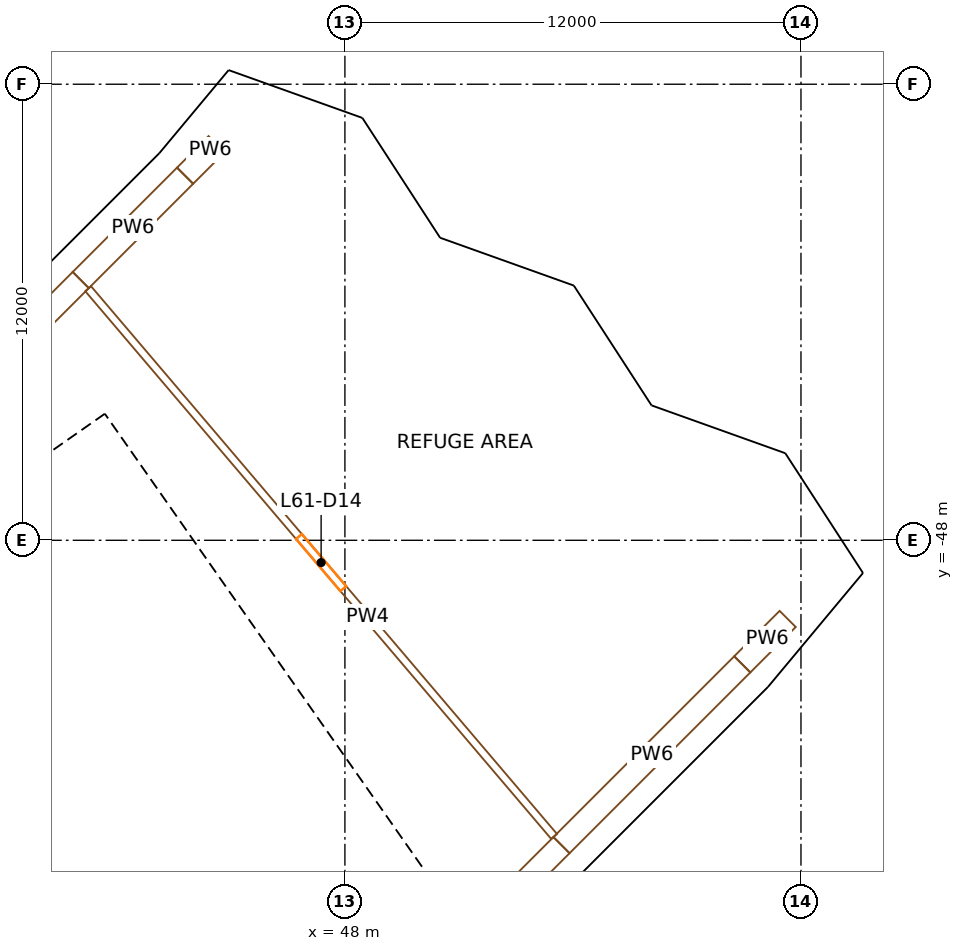
"""IFC4 building model, lengths in metres.
Left out: names, types, materials, properties, quantities, classifications, styles, units other than length and angle.
Written with IfcOpenShell. Run it as: python <this file> out.ifc"""

import sys

from ifc_helpers import new_model, si_unit, direction, frame, frame_2d, origin, origin_2d, place, context, subcontext, project, spatial, rectangle, extrude, element, fill, save


model = new_model("IFC4")
c1 = context("Model", 3, precision=1e-05, world=origin(), true_north=direction((0.0, 1.0)))
c2 = subcontext(c1, "Body", "Model", "MODEL_VIEW")
j1 = project(units=[si_unit("LENGTHUNIT", "METRE"), si_unit("PLANEANGLEUNIT", "RADIAN")], contexts=[c1])
p1 = place(None, origin())
s1 = spatial("IfcSite", under=j1, at=p1, CompositionType="ELEMENT")
p2 = place(p1, origin())
s2 = spatial("IfcBuilding", under=s1, at=p2, CompositionType="ELEMENT")
p3 = place(p2, frame((0.0, 0.0, 253.1)))
s3 = spatial("IfcBuildingStorey", under=s2, at=p3, CompositionType="ELEMENT", Elevation=253.1)
for number, where, z_axis, x_axis in (
    (1, (43.795, -38.407, 0.0), (0.0, 0.0, 1.0), (0.659, 0.752, 0.0)),
    (2, (58.456, -51.264, 0.0), (0.0, 0.0, 1.0), (0.659, 0.752, 0.0)),
):
    element("IfcColumn", number, at=place(p3, frame(where, z_axis=z_axis, x_axis=x_axis)), inside=s3, PredefinedType="COLUMN", context=c2, shape_type="SweptSolid", body=[
        extrude(rectangle(XDim=1.0, YDim=1.15, at=origin_2d()), origin(), (0.0, 0.0, 1.0), 5.0),
    ])
p4 = place(p3, frame((49.483, -57.031, 0.0), z_axis=(0.0, 0.0, 1.0), x_axis=(-0.573560421458, 0.819163257805, 0.0)))
e3 = element("IfcWall", 3, at=p4, inside=s3, PredefinedType="SHEAR", context=c2, shape_type="SweptSolid", body=[
    extrude(rectangle(XDim=14.2, YDim=0.6, at=frame_2d((7.1, 0.0))), origin(), (0.0, 0.0, 1.0), 4.7),
])
p5 = place(p4, frame((6.4, 0.0, 0.0)))
e4 = element("IfcOpeningElement", 4, at=p5, cuts=e3, PredefinedType="OPENING", context=c2, shape_type="SweptSolid", body=[
    extrude(rectangle(XDim=1.4, YDim=2.1, at=frame_2d((0.7, 1.05))), frame((0.0, 0.31, 0.0), z_axis=(0.0, -1.0, 0.0), x_axis=(1.0, 0.0, 0.0)), (0.0, 0.0, 1.0), 0.62),
])
p6 = place(p3, frame((28.941, -54.447, 0.0), z_axis=(0.0, 0.0, 1.0), x_axis=(0.819153391756, 0.573574511963, 0.0)))
e5 = element("IfcWall", 5, at=p6, inside=s3, PredefinedType="SHEAR", context=c2, shape_type="SweptSolid", body=[
    extrude(rectangle(XDim=15.045, YDim=0.6, at=frame_2d((7.523, 0.0))), origin(), (0.0, 0.0, 1.0), 4.7),
])
p7 = place(p6, frame((3.45, 0.0, 0.0)))
e6 = element("IfcOpeningElement", 6, at=p7, cuts=e5, PredefinedType="OPENING", context=c2, shape_type="SweptSolid", body=[
    extrude(rectangle(XDim=1.0, YDim=2.1, at=frame_2d((0.5, 1.05))), frame((0.0, 0.31, 0.0), z_axis=(0.0, -1.0, 0.0), x_axis=(1.0, 0.0, 0.0)), (0.0, 0.0, 1.0), 0.62),
])
p8 = place(p6, frame((13.495, 0.0, 0.0)))
e7 = element("IfcOpeningElement", 7, at=p8, cuts=e5, PredefinedType="OPENING", context=c2, shape_type="SweptSolid", body=[
    extrude(rectangle(XDim=1.1, YDim=2.1, at=frame_2d((0.55, 1.05))), frame((0.0, 0.31, 0.0), z_axis=(0.0, -1.0, 0.0), x_axis=(1.0, 0.0, 0.0)), (0.0, 0.0, 1.0), 0.62),
])
p9 = place(p3, frame((36.741, -65.587, 0.0), z_axis=(0.0, 0.0, 1.0), x_axis=(0.819153391756, 0.573574511963, 0.0)))
e8 = element("IfcWall", 8, at=p9, inside=s3, PredefinedType="SHEAR", context=c2, shape_type="SweptSolid", body=[
    extrude(rectangle(XDim=15.045, YDim=0.6, at=frame_2d((7.523, 0.0))), origin(), (0.0, 0.0, 1.0), 4.7),
])
p10 = place(p9, frame((3.45, 0.0, 0.0)))
e9 = element("IfcOpeningElement", 9, at=p10, cuts=e8, PredefinedType="OPENING", context=c2, shape_type="SweptSolid", body=[
    extrude(rectangle(XDim=1.0, YDim=2.1, at=frame_2d((0.5, 1.05))), frame((0.0, 0.31, 0.0), z_axis=(0.0, -1.0, 0.0), x_axis=(1.0, 0.0, 0.0)), (0.0, 0.0, 1.0), 0.62),
])
p11 = place(p9, frame((13.495, 0.0, 0.0)))
e10 = element("IfcOpeningElement", 10, at=p11, cuts=e8, PredefinedType="OPENING", context=c2, shape_type="SweptSolid", body=[
    extrude(rectangle(XDim=1.1, YDim=2.1, at=frame_2d((0.55, 1.05))), frame((0.0, 0.31, 0.0), z_axis=(0.0, -1.0, 0.0), x_axis=(1.0, 0.0, 0.0)), (0.0, 0.0, 1.0), 0.62),
])
p12 = place(p3, frame((43.204, -60.696, 0.0), z_axis=(0.0, 0.0, 1.0), x_axis=(-0.573571992966, 0.819155155563, 0.0)))
e11 = element("IfcWall", 11, at=p12, inside=s3, PredefinedType="SOLIDWALL", context=c2, shape_type="SweptSolid", body=[
    extrude(rectangle(XDim=13.0, YDim=0.3, at=frame_2d((6.5, 0.0))), origin(), (0.0, 0.0, 1.0), 4.7),
])
p13 = place(p3, frame((33.787, -61.369, 0.0), z_axis=(0.0, 0.0, 1.0), x_axis=(0.819152564888, 0.573575692858, 0.0)))
e12 = element("IfcWall", 12, at=p13, inside=s3, PredefinedType="SOLIDWALL", context=c2, shape_type="SweptSolid", body=[
    extrude(rectangle(XDim=7.95, YDim=0.3, at=frame_2d((3.975, 0.0))), origin(), (0.0, 0.0, 1.0), 4.7),
])
p14 = place(p13, frame((0.675, 0.0, 0.0)))
e13 = element("IfcOpeningElement", 13, at=p14, cuts=e12, PredefinedType="OPENING", context=c2, shape_type="SweptSolid", body=[
    extrude(rectangle(XDim=1.1, YDim=2.1, at=frame_2d((0.55, 1.05))), frame((0.0, 0.16, 0.0), z_axis=(0.0, -1.0, 0.0), x_axis=(1.0, 0.0, 0.0)), (0.0, 0.0, 1.0), 0.32),
])
p15 = place(p13, frame((3.425, 0.0, 0.0)))
e14 = element("IfcOpeningElement", 14, at=p15, cuts=e12, PredefinedType="OPENING", context=c2, shape_type="SweptSolid", body=[
    extrude(rectangle(XDim=1.1, YDim=2.1, at=frame_2d((0.55, 1.05))), frame((0.0, 0.16, 0.0), z_axis=(0.0, -1.0, 0.0), x_axis=(1.0, 0.0, 0.0)), (0.0, 0.0, 1.0), 0.32),
])
p16 = place(p3, frame((37.936, -52.91, 0.0), z_axis=(0.0, 0.0, 1.0), x_axis=(0.819147518138, 0.57358290031, 0.0)))
e15 = element("IfcWall", 15, at=p16, inside=s3, PredefinedType="SOLIDWALL", context=c2, shape_type="SweptSolid", body=[
    extrude(rectangle(XDim=6.795, YDim=0.3, at=frame_2d((3.398, 0.0))), origin(), (0.0, 0.0, 1.0), 4.7),
])
p17 = place(p16, frame((5.32, 0.0, 0.0)))
e16 = element("IfcOpeningElement", 16, at=p17, cuts=e15, PredefinedType="OPENING", context=c2, shape_type="SweptSolid", body=[
    extrude(rectangle(XDim=1.1, YDim=2.1, at=frame_2d((0.55, 1.05))), frame((0.0, 0.16, 0.0), z_axis=(0.0, -1.0, 0.0), x_axis=(1.0, 0.0, 0.0)), (0.0, 0.0, 1.0), 0.32),
])
p18 = place(p3, frame((41.262, -57.661, 0.0), z_axis=(0.0, 0.0, 1.0), x_axis=(0.819164398642, 0.573558792102, 0.0)))
e17 = element("IfcWall", 17, at=p18, inside=s3, PredefinedType="SOLIDWALL", context=c2, shape_type="SweptSolid", body=[
    extrude(rectangle(XDim=6.795, YDim=0.3, at=frame_2d((3.397, 0.0))), origin(), (0.0, 0.0, 1.0), 4.7),
])
p19 = place(p18, frame((5.32, 0.0, 0.0)))
e18 = element("IfcOpeningElement", 18, at=p19, cuts=e17, PredefinedType="OPENING", context=c2, shape_type="SweptSolid", body=[
    extrude(rectangle(XDim=1.1, YDim=2.1, at=frame_2d((0.55, 1.05))), frame((0.0, 0.16, 0.0), z_axis=(0.0, -1.0, 0.0), x_axis=(1.0, 0.0, 0.0)), (0.0, 0.0, 1.0), 0.32),
])
p20 = place(p3, frame((39.599, -55.285, 0.0), z_axis=(0.0, 0.0, 1.0), x_axis=(0.819136323161, 0.573598887793, 0.0)))
e19 = element("IfcWall", 19, at=p20, inside=s3, PredefinedType="SOLIDWALL", context=c2, shape_type="SweptSolid", body=[
    extrude(rectangle(XDim=3.0, YDim=0.5, at=frame_2d((1.5, 0.0))), origin(), (0.0, 0.0, 1.0), 4.7),
])
p21 = place(p3, frame((43.757, -55.731, 0.0), z_axis=(0.0, 0.0, 1.0), x_axis=(-0.573536818435, 0.819179783625, 0.0)))
e20 = element("IfcWall", 20, at=p21, inside=s3, PredefinedType="SOLIDWALL", context=c2, shape_type="SweptSolid", body=[
    extrude(rectangle(XDim=5.5, YDim=0.3, at=frame_2d((2.75, 0.0))), origin(), (0.0, 0.0, 1.0), 4.7),
])
p22 = place(p21, frame((0.7, 0.0, 0.0)))
e21 = element("IfcOpeningElement", 21, at=p22, cuts=e20, PredefinedType="OPENING", context=c2, shape_type="SweptSolid", body=[
    extrude(rectangle(XDim=1.1, YDim=2.1, at=frame_2d((0.55, 1.05))), frame((0.0, 0.16, 0.0), z_axis=(0.0, -1.0, 0.0), x_axis=(1.0, 0.0, 0.0)), (0.0, 0.0, 1.0), 0.32),
])
p23 = place(p21, frame((3.7, 0.0, 0.0)))
e22 = element("IfcOpeningElement", 22, at=p23, cuts=e20, PredefinedType="OPENING", context=c2, shape_type="SweptSolid", body=[
    extrude(rectangle(XDim=1.1, YDim=2.1, at=frame_2d((0.55, 1.05))), frame((0.0, 0.16, 0.0), z_axis=(0.0, -1.0, 0.0), x_axis=(1.0, 0.0, 0.0)), (0.0, 0.0, 1.0), 0.32),
])
p24 = place(p3, frame((41.3, -47.96, 0.0), z_axis=(0.0, 0.0, 1.0), x_axis=(0.573495128918, -0.819208970354, 0.0)))
e23 = element("IfcWall", 23, at=p24, inside=s3, PredefinedType="SOLIDWALL", context=c2, shape_type="SweptSolid", body=[
    extrude(rectangle(XDim=0.5, YDim=0.3, at=frame_2d((0.25, 0.0))), origin(), (0.0, 0.0, 1.0), 2.3),
])
p25 = place(p3, frame((46.778, -55.782, 0.0), z_axis=(0.0, 0.0, 1.0), x_axis=(0.573822822947, -0.818979467304, 0.0)))
e24 = element("IfcWall", 24, at=p25, inside=s3, PredefinedType="SOLIDWALL", context=c2, shape_type="SweptSolid", body=[
    extrude(rectangle(XDim=0.5, YDim=0.3, at=frame_2d((0.25, 0.0))), origin(), (0.0, 0.0, 1.0), 2.3),
])
p26 = place(p3, frame((61.487, -49.005, 0.0), z_axis=(0.0, 0.0, 1.0), x_axis=(-0.54407895318, 0.839034023569, 0.0)))
e25 = element("IfcWall", 25, at=p26, inside=s3, PredefinedType="SOLIDWALL", context=c2, shape_type="SweptSolid", body=[
    extrude(rectangle(XDim=3.851, YDim=0.4, at=frame_2d((1.926, 0.0))), origin(), (0.0, 0.0, 1.0), 3.6),
])
p27 = place(p3, frame((59.253, -45.802, 0.0), z_axis=(0.0, 0.0, 1.0), x_axis=(-0.941574689973, 0.336804250571, 0.0)))
e26 = element("IfcWall", 26, at=p27, inside=s3, PredefinedType="SOLIDWALL", context=c2, shape_type="SweptSolid", body=[
    extrude(rectangle(XDim=3.305, YDim=0.4, at=frame_2d((1.653, 0.0))), origin(), (0.0, 0.0, 1.0), 3.6),
])
p28 = place(p3, frame((56.002, -44.716, 0.0), z_axis=(0.0, 0.0, 1.0), x_axis=(-0.544198076362, 0.838956765086, 0.0)))
e27 = element("IfcWall", 27, at=p28, inside=s3, PredefinedType="SOLIDWALL", context=c2, shape_type="SweptSolid", body=[
    extrude(rectangle(XDim=3.997, YDim=0.4, at=frame_2d((1.999, 0.0))), origin(), (0.0, 0.0, 1.0), 3.6),
])
p29 = place(p3, frame((53.688, -41.39, 0.0), z_axis=(0.0, 0.0, 1.0), x_axis=(-0.94159640431, 0.336743539494, 0.0)))
e28 = element("IfcWall", 28, at=p29, inside=s3, PredefinedType="SOLIDWALL", context=c2, shape_type="SweptSolid", body=[
    extrude(rectangle(XDim=3.305, YDim=0.4, at=frame_2d((1.652, 0.0))), origin(), (0.0, 0.0, 1.0), 3.6),
])
p30 = place(p3, frame((50.438, -40.305, 0.0), z_axis=(0.0, 0.0, 1.0), x_axis=(-0.544258469642, 0.838917587265, 0.0)))
e29 = element("IfcWall", 29, at=p30, inside=s3, PredefinedType="SOLIDWALL", context=c2, shape_type="SweptSolid", body=[
    extrude(rectangle(XDim=3.999, YDim=0.4, at=frame_2d((1.999, 0.0))), origin(), (0.0, 0.0, 1.0), 3.6),
])
p31 = place(p3, frame((48.124, -36.979, 0.0), z_axis=(0.0, 0.0, 1.0), x_axis=(-0.941635407731, 0.336634458883, 0.0)))
e30 = element("IfcWall", 30, at=p31, inside=s3, PredefinedType="SOLIDWALL", context=c2, shape_type="SweptSolid", body=[
    extrude(rectangle(XDim=3.061, YDim=0.4, at=frame_2d((1.531, 0.0))), origin(), (0.0, 0.0, 1.0), 3.6),
])
p32 = place(p3, frame((43.239, -37.975, 0.0), z_axis=(0.0, 0.0, 1.0), x_axis=(-0.707106781187, -0.707106781187, 0.0)))
e31 = element("IfcWall", 31, at=p32, inside=s3, PredefinedType="SOLIDWALL", context=c2, shape_type="SweptSolid", body=[
    extrude(rectangle(XDim=7.435, YDim=0.4, at=frame_2d((3.718, 0.0))), origin(), (0.0, 0.0, 1.0), 3.6),
])
p33 = place(p3, frame((45.123, -35.721, 0.0), z_axis=(0.0, 0.0, 1.0), x_axis=(-0.64047220124, -0.767981353575, 0.0)))
e32 = element("IfcWall", 32, at=p33, inside=s3, PredefinedType="SOLIDWALL", context=c2, shape_type="SweptSolid", body=[
    extrude(rectangle(XDim=2.92, YDim=0.4, at=frame_2d((1.46, 0.0))), origin(), (0.0, 0.0, 1.0), 3.6),
])
p34 = place(p3, frame((51.708, -58.999, 0.0), z_axis=(0.0, 0.0, 1.0), x_axis=(0.707094942107, 0.707118620068, 0.0)))
e33 = element("IfcWall", 33, at=p34, inside=s3, PredefinedType="SOLIDWALL", context=c2, shape_type="SweptSolid", body=[
    extrude(rectangle(XDim=10.311, YDim=0.4, at=frame_2d((5.155, 0.0))), origin(), (0.0, 0.0, 1.0), 3.6),
])
p35 = place(p3, frame((59.009, -51.693, 0.0), z_axis=(0.0, 0.0, 1.0), x_axis=(0.640531267618, 0.76793209023, 0.0)))
e34 = element("IfcWall", 34, at=p35, inside=s3, PredefinedType="SOLIDWALL", context=c2, shape_type="SweptSolid", body=[
    extrude(rectangle(XDim=3.461, YDim=0.4, at=frame_2d((1.73, 0.0))), origin(), (0.0, 0.0, 1.0), 3.6),
])
p36 = place(p3, frame((38.423, -43.779, 0.0), z_axis=(0.0, 0.0, 1.0), x_axis=(0.707139643126, 0.70707391772, 0.0)))
e35 = element("IfcWall", 35, at=p36, inside=s3, PredefinedType="PARTITIONING", context=c2, shape_type="SweptSolid", body=[
    extrude(rectangle(XDim=3.715, YDim=0.6, at=frame_2d((1.857, 0.0))), origin(), (0.0, 0.0, 1.0), 3.6),
])
p37 = place(p3, frame((41.05, -41.152, 0.0), z_axis=(0.0, 0.0, 1.0), x_axis=(0.70707531296, 0.707138248013, 0.0)))
e36 = element("IfcWall", 36, at=p37, inside=s3, PredefinedType="PARTITIONING", context=c2, shape_type="SweptSolid", body=[
    extrude(rectangle(XDim=3.879, YDim=0.6, at=frame_2d((1.939, 0.0))), origin(), (0.0, 0.0, 1.0), 3.6),
])
p38 = place(p3, frame((41.244, -41.381, 0.0), z_axis=(0.0, 0.0, 1.0), x_axis=(0.647960358765, -0.761674059864, 0.0)))
e37 = element("IfcWall", 37, at=p38, inside=s3, PredefinedType="PARTITIONING", context=c2, shape_type="SweptSolid", body=[
    extrude(rectangle(XDim=18.921, YDim=0.2, at=frame_2d((9.461, 0.0))), origin(), (0.0, 0.0, 1.0), 3.6),
])
p39 = place(p38, frame((8.561, 0.0, 0.0)))
e38 = element("IfcOpeningElement", 38, at=p39, cuts=e37, PredefinedType="OPENING", context=c2, shape_type="SweptSolid", body=[
    extrude(rectangle(XDim=1.8, YDim=2.4, at=frame_2d((0.9, 1.2))), frame((0.0, 0.11, 0.0), z_axis=(0.0, -1.0, 0.0), x_axis=(1.0, 0.0, 0.0)), (0.0, 0.0, 1.0), 0.22),
])
p40 = place(p3, frame((43.797, -38.405, 0.0), z_axis=(0.0, 0.0, 1.0), x_axis=(0.70700240348, 0.707211143487, 0.0)))
e39 = element("IfcWall", 39, at=p40, inside=s3, PredefinedType="PARTITIONING", context=c2, shape_type="SweptSolid", body=[
    extrude(rectangle(XDim=1.17, YDim=0.6, at=frame_2d((0.585, 0.0))), origin(), (0.0, 0.0, 1.0), 3.6),
])
p41 = place(p3, frame((51.28, -58.439, 0.0), z_axis=(0.0, 0.0, 1.0), x_axis=(0.707106781187, 0.707106781187, 0.0)))
e40 = element("IfcWall", 40, at=p41, inside=s3, PredefinedType="PARTITIONING", context=c2, shape_type="SweptSolid", body=[
    extrude(rectangle(XDim=3.42, YDim=0.6, at=frame_2d((1.71, 0.0))), origin(), (0.0, 0.0, 1.0), 3.6),
])
p42 = place(p3, frame((53.699, -56.021, 0.0), z_axis=(0.0, 0.0, 1.0), x_axis=(0.707106781187, 0.707106781187, 0.0)))
e41 = element("IfcWall", 41, at=p42, inside=s3, PredefinedType="PARTITIONING", context=c2, shape_type="SweptSolid", body=[
    extrude(rectangle(XDim=6.724, YDim=0.6, at=frame_2d((3.362, 0.0))), origin(), (0.0, 0.0, 1.0), 3.6),
])
p43 = place(p3, frame((58.458, -51.262, 0.0), z_axis=(0.0, 0.0, 1.0), x_axis=(0.707106781187, 0.707106781187, 0.0)))
e42 = element("IfcWall", 42, at=p43, inside=s3, PredefinedType="PARTITIONING", context=c2, shape_type="SweptSolid", body=[
    extrude(rectangle(XDim=1.686, YDim=0.6, at=frame_2d((0.843, 0.0))), origin(), (0.0, 0.0, 1.0), 3.6),
])
p44 = place(p22, origin())
e43 = element("IfcDoor", 43, at=p44, inside=s3, OperationType="DOUBLE_DOOR_SLIDING", PredefinedType="DOOR", context=c2, shape_type="SweptSolid", body=[
    extrude(rectangle(XDim=1.1, YDim=2.1, at=frame_2d((0.55, 1.05))), frame((0.0, 0.025, 0.0), z_axis=(0.0, -1.0, 0.0), x_axis=(1.0, 0.0, 0.0)), (0.0, 0.0, 1.0), 0.05),
])
fill(e21, e43)
p45 = place(p23, origin())
e44 = element("IfcDoor", 44, at=p45, inside=s3, OperationType="DOUBLE_DOOR_SLIDING", PredefinedType="DOOR", context=c2, shape_type="SweptSolid", body=[
    extrude(rectangle(XDim=1.1, YDim=2.1, at=frame_2d((0.55, 1.05))), frame((0.0, 0.025, 0.0), z_axis=(0.0, -1.0, 0.0), x_axis=(1.0, 0.0, 0.0)), (0.0, 0.0, 1.0), 0.05),
])
fill(e22, e44)
p46 = place(p5, origin())
e45 = element("IfcDoor", 45, at=p46, inside=s3, OperationType="DOUBLE_DOOR_SINGLE_SWING", PredefinedType="DOOR", context=c2, shape_type="SweptSolid", body=[
    extrude(rectangle(XDim=1.4, YDim=2.1, at=frame_2d((0.7, 1.05))), frame((0.0, 0.025, 0.0), z_axis=(0.0, -1.0, 0.0), x_axis=(1.0, 0.0, 0.0)), (0.0, 0.0, 1.0), 0.05),
])
fill(e4, e45)
p47 = place(p8, origin())
e46 = element("IfcDoor", 46, at=p47, inside=s3, OperationType="SINGLE_SWING_RIGHT", PredefinedType="DOOR", context=c2, shape_type="SweptSolid", body=[
    extrude(rectangle(XDim=1.1, YDim=2.1, at=frame_2d((0.55, 1.05))), frame((0.0, 0.025, 0.0), z_axis=(0.0, -1.0, 0.0), x_axis=(1.0, 0.0, 0.0)), (0.0, 0.0, 1.0), 0.05),
])
fill(e7, e46)
p48 = place(p17, origin())
e47 = element("IfcDoor", 47, at=p48, inside=s3, OperationType="SINGLE_SWING_LEFT", PredefinedType="DOOR", context=c2, shape_type="SweptSolid", body=[
    extrude(rectangle(XDim=1.1, YDim=2.1, at=frame_2d((0.55, 1.05))), frame((0.0, 0.025, 0.0), z_axis=(0.0, -1.0, 0.0), x_axis=(1.0, 0.0, 0.0)), (0.0, 0.0, 1.0), 0.05),
])
fill(e16, e47)
p49 = place(p19, origin())
e48 = element("IfcDoor", 48, at=p49, inside=s3, OperationType="SINGLE_SWING_LEFT", PredefinedType="DOOR", context=c2, shape_type="SweptSolid", body=[
    extrude(rectangle(XDim=1.1, YDim=2.1, at=frame_2d((0.55, 1.05))), frame((0.0, 0.025, 0.0), z_axis=(0.0, -1.0, 0.0), x_axis=(1.0, 0.0, 0.0)), (0.0, 0.0, 1.0), 0.05),
])
fill(e18, e48)
p50 = place(p39, origin())
e49 = element("IfcDoor", 49, at=p50, inside=s3, OperationType="DOUBLE_DOOR_SINGLE_SWING", PredefinedType="DOOR", context=c2, shape_type="SweptSolid", body=[
    extrude(rectangle(XDim=1.8, YDim=2.4, at=frame_2d((0.9, 1.2))), frame((0.0, 0.025, 0.0), z_axis=(0.0, -1.0, 0.0), x_axis=(1.0, 0.0, 0.0)), (0.0, 0.0, 1.0), 0.05),
])
fill(e38, e49)
save(model, sys.argv[1])
